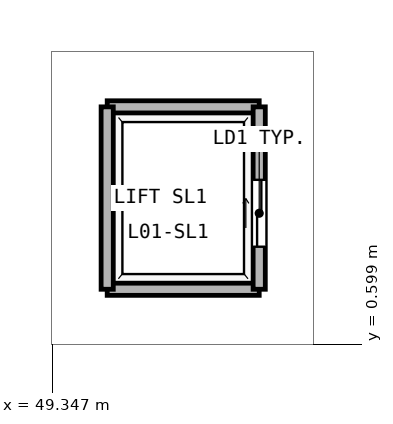
"""IFC4 building model, lengths in metres.
Left out: names, types, materials, properties, quantities, classifications, styles, units other than length and angle.
Written with IfcOpenShell. Run it as: python <this file> out.ifc"""

import sys

from ifc_helpers import new_model, si_unit, direction, frame, frame_2d, origin, place, context, subcontext, project, spatial, rectangle, extrude, element, fill, save


model = new_model("IFC4")
c1 = context("Model", 3, precision=1e-05, world=origin(), true_north=direction((0.0, 1.0)))
c2 = subcontext(c1, "Body", "Model", "MODEL_VIEW")
j1 = project(units=[si_unit("LENGTHUNIT", "METRE"), si_unit("PLANEANGLEUNIT", "RADIAN")], contexts=[c1])
p1 = place(None, origin())
s1 = spatial("IfcSite", under=j1, at=p1, CompositionType="ELEMENT")
p2 = place(p1, origin())
s2 = spatial("IfcBuilding", under=s1, at=p2, CompositionType="ELEMENT")
p3 = place(p2, frame((0.0, 0.0, 4.5)))
s3 = spatial("IfcBuildingStorey", under=s2, at=p3, CompositionType="ELEMENT", Elevation=4.5)
for number, where, z_axis, x_axis in (
    (1, (50.25, 1.5, 0.0), (0.0, 0.0, 1.0), (1.0, 0.0, 0.0)),
    (2, (50.25, 4.5, 0.0), (0.0, 0.0, 1.0), (1.0, 0.0, 0.0)),
):
    element("IfcWall", number, at=place(p3, frame(where, z_axis=z_axis, x_axis=x_axis)), inside=s3, PredefinedType="PARTITIONING", context=c2, shape_type="SweptSolid", body=[
        extrude(rectangle(XDim=2.5, YDim=0.2, at=frame_2d((1.25, 0.0))), origin(), (0.0, 0.0, 1.0), 4.18),
    ])
p4 = place(p3, frame((50.25, 1.5, 0.0), z_axis=(0.0, 0.0, 1.0), x_axis=(0.0, 1.0, 0.0)))
e3 = element("IfcWall", 3, at=p4, inside=s3, PredefinedType="PARTITIONING", context=c2, shape_type="SweptSolid", body=[
    extrude(rectangle(XDim=3.0, YDim=0.2, at=frame_2d((1.5, 0.0))), origin(), (0.0, 0.0, 1.0), 4.18),
])
p5 = place(p3, frame((52.75, 1.5, 0.0), z_axis=(0.0, 0.0, 1.0), x_axis=(0.0, 1.0, 0.0)))
e4 = element("IfcWall", 4, at=p5, inside=s3, PredefinedType="PARTITIONING", context=c2, shape_type="SweptSolid", body=[
    extrude(rectangle(XDim=3.0, YDim=0.2, at=frame_2d((1.5, 0.0))), origin(), (0.0, 0.0, 1.0), 4.18),
])
p6 = place(p5, frame((0.7, 0.0, 0.0)))
e5 = element("IfcOpeningElement", 5, at=p6, cuts=e4, PredefinedType="OPENING", context=c2, shape_type="SweptSolid", body=[
    extrude(rectangle(XDim=1.1, YDim=2.25, at=frame_2d((0.55, 1.125))), frame((0.0, 0.11, 0.0), z_axis=(0.0, -1.0, 0.0), x_axis=(1.0, 0.0, 0.0)), (0.0, 0.0, 1.0), 0.22),
])
p7 = place(p6, origin())
e6 = element("IfcDoor", 6, at=p7, inside=s3, OperationType="DOUBLE_DOOR_SLIDING", PredefinedType="DOOR", context=c2, shape_type="SweptSolid", body=[
    extrude(rectangle(XDim=1.1, YDim=2.25, at=frame_2d((0.55, 1.125))), frame((0.0, 0.025, 0.0), z_axis=(0.0, -1.0, 0.0), x_axis=(1.0, 0.0, 0.0)), (0.0, 0.0, 1.0), 0.05),
])
fill(e5, e6)
save(model, sys.argv[1])
